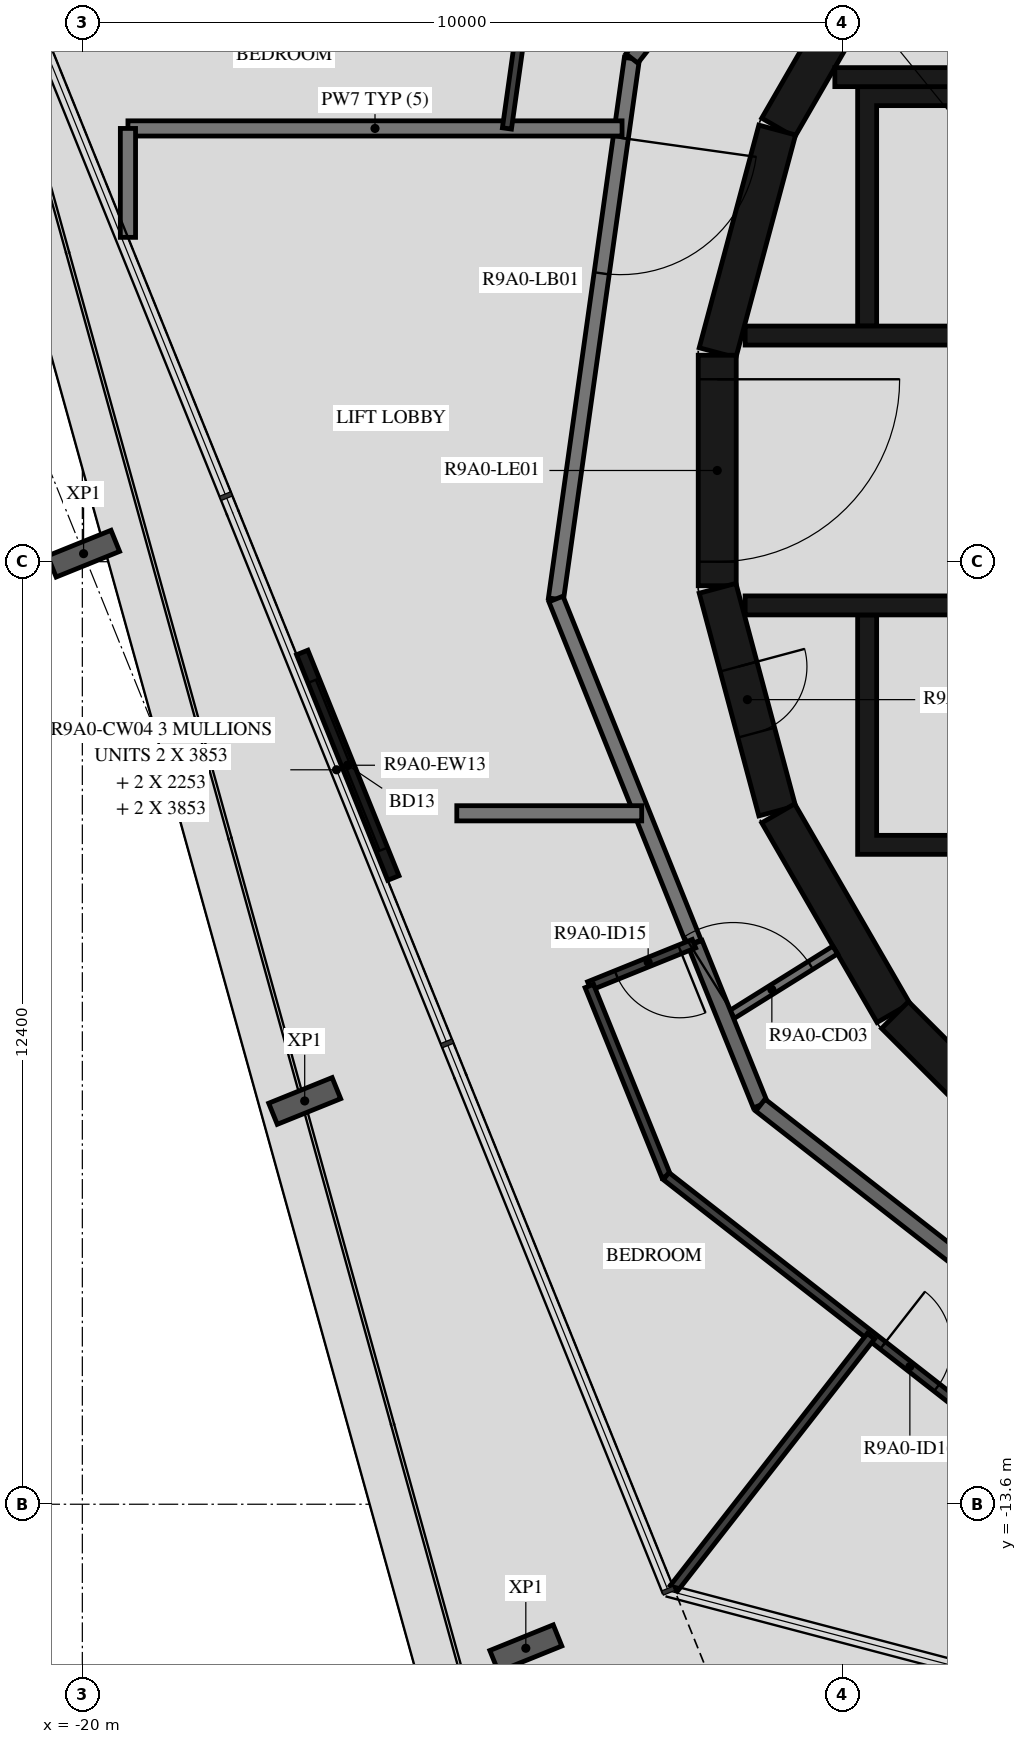
"""IFC4 building model, lengths in metres.
Left out: names, types, materials, properties, quantities, classifications, styles, units other than length and angle.
Written with IfcOpenShell. Run it as: python <this file> out.ifc"""

import sys

from ifc_helpers import new_model, si_unit, direction, frame, frame_2d, origin, origin_2d, place, context, subcontext, project, spatial, polyline, rectangle, i_section, outline, extrude, element, fill, save


model = new_model("IFC4")
c1 = context("Model", 3, precision=1e-05, world=origin(), true_north=direction((0.0, 1.0)))
c2 = subcontext(c1, "Body", "Model", "MODEL_VIEW")
j1 = project(units=[si_unit("LENGTHUNIT", "METRE"), si_unit("PLANEANGLEUNIT", "RADIAN")], contexts=[c1])
p1 = place(None, origin())
s1 = spatial("IfcSite", under=j1, at=p1, CompositionType="ELEMENT")
p2 = place(p1, origin())
s2 = spatial("IfcBuilding", under=s1, at=p2, CompositionType="ELEMENT")
p3 = place(p2, frame((0.0, 0.0, 333.0)))
s3 = spatial("IfcBuildingStorey", under=s2, at=p3, CompositionType="ELEMENT", Elevation=333.0)
for number, where, z_axis, x_axis in (
    (1, (-19.984, -1.094, -0.45), (0.0, 0.0, 1.0), (-0.375, 0.927, 0.0)),
    (2, (-17.075, -8.294, -0.45), (0.0, 0.0, 1.0), (-0.375, 0.927, 0.0)),
    (3, (-14.166, -15.495, -0.45), (0.0, 0.0, 1.0), (-0.375, 0.927, 0.0)),
):
    element("IfcColumn", number, at=place(p3, frame(where, z_axis=z_axis, x_axis=x_axis)), inside=s3, PredefinedType="COLUMN", context=c2, shape_type="SweptSolid", body=[
        extrude(i_section(OverallWidth=0.3, OverallDepth=0.9, WebThickness=0.019, FlangeThickness=0.035, FilletRadius=0.03, at=origin_2d()), origin(), (0.0, 0.0, 1.0), 3.57),
    ])
p4 = place(p3, frame((-17.107, -2.394, 0.0), z_axis=(0.0, 0.0, 1.0), x_axis=(0.374598019739, -0.927187318511, 0.0)))
e4 = element("IfcWall", 4, at=p4, inside=s3, PredefinedType="STANDARD", context=c2, shape_type="SweptSolid", body=[
    extrude(rectangle(XDim=3.2, YDim=0.16, at=frame_2d((1.6, 0.0))), origin(), (0.0, 0.0, 1.0), 3.12),
])
p5 = place(p4, frame((0.4, 0.0, 0.0)))
e5 = element("IfcOpeningElement", 5, at=p5, cuts=e4, PredefinedType="OPENING", context=c2, shape_type="SweptSolid", body=[
    extrude(rectangle(XDim=2.4, YDim=2.4, at=frame_2d((1.2, 1.2))), frame((0.0, 0.09, 0.0), z_axis=(0.0, -1.0, 0.0), x_axis=(1.0, 0.0, 0.0)), (0.0, 0.0, 1.0), 0.18),
])
for number, where, z_axis, x_axis in (
    (6, (-9.329, 7.137, 0.0), (0.0, 0.0, 1.0), (-0.5, -0.866, 0.0)),
    (7, (-10.858, 4.479, 0.0), (0.0, 0.0, 1.0), (-0.259, -0.966, 0.0)),
):
    element("IfcWall", number, at=place(p3, frame(where, z_axis=z_axis, x_axis=x_axis)), inside=s3, PredefinedType="SHEAR", context=c2, shape_type="SweptSolid", body=[
        extrude(rectangle(XDim=3.033, YDim=0.5, at=frame_2d((1.516, 0.0))), origin(), (0.0, 0.0, 1.0), 3.12),
    ])
p6 = place(p3, frame((-11.647, 1.516, 0.0), z_axis=(0.0, 0.0, 1.0), x_axis=(0.0, -1.0, 0.0)))
e8 = element("IfcWall", 8, at=p6, inside=s3, PredefinedType="SHEAR", context=c2, shape_type="SweptSolid", body=[
    extrude(rectangle(XDim=3.033, YDim=0.5, at=frame_2d((1.516, 0.0))), origin(), (0.0, 0.0, 1.0), 3.12),
])
p7 = place(p6, frame((0.316, 0.0, 0.0)))
e9 = element("IfcOpeningElement", 9, at=p7, cuts=e8, PredefinedType="OPENING", context=c2, shape_type="SweptSolid", body=[
    extrude(rectangle(XDim=2.4, YDim=2.1, at=frame_2d((1.2, 1.05))), frame((0.0, 0.26, 0.0), z_axis=(0.0, -1.0, 0.0), x_axis=(1.0, 0.0, 0.0)), (0.0, 0.0, 1.0), 0.52),
])
p8 = place(p3, frame((-11.643, -1.55, 0.0), z_axis=(0.0, 0.0, 1.0), x_axis=(0.258734743916, -0.965948410781, 0.0)))
e10 = element("IfcWall", 10, at=p8, inside=s3, PredefinedType="SHEAR", context=c2, shape_type="SweptSolid", body=[
    extrude(rectangle(XDim=3.033, YDim=0.5, at=frame_2d((1.516, 0.0))), origin(), (0.0, 0.0, 1.0), 3.12),
])
p9 = place(p8, frame((1.066, 0.0, 0.0)))
e11 = element("IfcOpeningElement", 11, at=p9, cuts=e10, PredefinedType="OPENING", context=c2, shape_type="SweptSolid", body=[
    extrude(rectangle(XDim=0.9, YDim=2.1, at=frame_2d((0.45, 1.05))), frame((0.0, 0.26, 0.0), z_axis=(0.0, -1.0, 0.0), x_axis=(1.0, 0.0, 0.0)), (0.0, 0.0, 1.0), 0.52),
])
p10 = place(p3, frame((-10.845, -4.51, 0.0), z_axis=(0.0, 0.0, 1.0), x_axis=(0.500087131594, -0.865975092491, 0.0)))
e12 = element("IfcWall", 12, at=p10, inside=s3, PredefinedType="SHEAR", context=c2, shape_type="SweptSolid", body=[
    extrude(rectangle(XDim=3.033, YDim=0.5, at=frame_2d((1.516, 0.0))), origin(), (0.0, 0.0, 1.0), 3.12),
])
p11 = place(p3, frame((-9.308, -7.164, 0.0), z_axis=(0.0, 0.0, 1.0), x_axis=(0.707106781187, -0.707106781187, 0.0)))
e13 = element("IfcWall", 13, at=p11, inside=s3, PredefinedType="SHEAR", context=c2, shape_type="SweptSolid", body=[
    extrude(rectangle(XDim=3.032, YDim=0.5, at=frame_2d((1.516, 0.0))), origin(), (0.0, 0.0, 1.0), 3.12),
])
p12 = place(p3, frame((-7.0, 5.175, 0.0), z_axis=(0.0, 0.0, 1.0), x_axis=(-1.0, 0.0, 0.0)))
e14 = element("IfcWall", 14, at=p12, inside=s3, PredefinedType="SHEAR", context=c2, shape_type="SweptSolid", body=[
    extrude(rectangle(XDim=3.1, YDim=0.25, at=frame_2d((1.55, 0.0))), origin(), (0.0, 0.0, 1.0), 3.12),
])
p13 = place(p3, origin())
e15 = element("IfcWall", 15, at=p13, inside=s3, PredefinedType="SHEAR", context=c2, shape_type="SweptSolid", body=[
    extrude(outline(polyline([(-9.8, 1.9), (-9.55, 1.9), (-9.55, 4.8), (-3.35, 4.8), (-3.35, 1.9), (-3.1, 1.9), (-3.1, 4.8), (3.1, 4.8), (3.1, 1.9), (3.35, 1.9), (3.35, 4.8), (5.25, 4.8), (5.25, 1.9), (5.5, 1.9), (5.5, 4.8), (7.4, 4.8), (7.4, 1.9), (7.65, 1.9), (7.65, 4.8), (9.55, 4.8), (9.55, 1.9), (9.8, 1.9), (9.8, 4.8), (9.8, 5.05), (-9.8, 5.05), (-9.8, 4.8), (-9.8, 1.9)])), origin(), (0.0, 0.0, 1.0), 3.12),
])
p14 = place(p3, origin())
e16 = element("IfcWall", 16, at=p14, inside=s3, PredefinedType="SHEAR", context=c2, shape_type="SweptSolid", body=[
    extrude(outline(polyline([(9.8, -5.05), (9.8, -4.8), (9.8, -1.9), (9.55, -1.9), (9.55, -4.8), (7.65, -4.8), (7.65, -1.9), (7.4, -1.9), (7.4, -4.8), (5.5, -4.8), (5.5, -1.9), (5.25, -1.9), (5.25, -4.8), (3.35, -4.8), (3.35, -1.9), (3.1, -1.9), (3.1, -4.8), (1.2, -4.8), (1.2, -1.9), (0.95, -1.9), (0.95, -4.8), (-0.95, -4.8), (-0.95, -1.9), (-1.2, -1.9), (-1.2, -4.8), (-3.1, -4.8), (-3.1, -1.9), (-3.35, -1.9), (-3.35, -4.8), (-5.25, -4.8), (-5.25, -1.9), (-5.5, -1.9), (-5.5, -4.8), (-9.55, -4.8), (-9.55, -1.9), (-9.8, -1.9), (-9.8, -4.8), (-9.8, -5.05), (9.8, -5.05)])), origin(), (0.0, 0.0, 1.0), 3.12),
])
p15 = place(p3, frame((-11.28, 1.775, 0.0), z_axis=(0.0, 0.0, 1.0), x_axis=(1.0, 0.0, 0.0)))
e17 = element("IfcWall", 17, at=p15, inside=s3, PredefinedType="SHEAR", context=c2, shape_type="SweptSolid", body=[
    extrude(rectangle(XDim=14.38, YDim=0.25, at=frame_2d((7.19, 0.0))), origin(), (0.0, 0.0, 1.0), 3.12),
])
p16 = place(p15, frame((4.38, 0.0, 0.0)))
e18 = element("IfcOpeningElement", 18, at=p16, cuts=e17, PredefinedType="OPENING", context=c2, shape_type="SweptSolid", body=[
    extrude(rectangle(XDim=0.9, YDim=2.1, at=frame_2d((0.45, 1.05))), frame((0.0, 0.135, 0.0), z_axis=(0.0, -1.0, 0.0), x_axis=(1.0, 0.0, 0.0)), (0.0, 0.0, 1.0), 0.27),
])
p17 = place(p15, frame((10.83, 0.0, 0.0)))
e19 = element("IfcOpeningElement", 19, at=p17, cuts=e17, PredefinedType="OPENING", context=c2, shape_type="SweptSolid", body=[
    extrude(rectangle(XDim=0.9, YDim=2.1, at=frame_2d((0.45, 1.05))), frame((0.0, 0.135, 0.0), z_axis=(0.0, -1.0, 0.0), x_axis=(1.0, 0.0, 0.0)), (0.0, 0.0, 1.0), 0.27),
])
p18 = place(p3, frame((-11.28, -1.775, 0.0), z_axis=(0.0, 0.0, 1.0), x_axis=(1.0, 0.0, 0.0)))
e20 = element("IfcWall", 20, at=p18, inside=s3, PredefinedType="SHEAR", context=c2, shape_type="SweptSolid", body=[
    extrude(rectangle(XDim=14.38, YDim=0.25, at=frame_2d((7.19, 0.0))), origin(), (0.0, 0.0, 1.0), 3.12),
])
p19 = place(p18, frame((6.43, 0.0, 0.0)))
e21 = element("IfcOpeningElement", 21, at=p19, cuts=e20, PredefinedType="OPENING", context=c2, shape_type="SweptSolid", body=[
    extrude(rectangle(XDim=1.1, YDim=2.1, at=frame_2d((0.55, 1.05))), frame((0.0, 0.135, 0.0), z_axis=(0.0, -1.0, 0.0), x_axis=(1.0, 0.0, 0.0)), (0.0, 0.0, 1.0), 0.27),
])
p20 = place(p18, frame((8.58, 0.0, 0.0)))
e22 = element("IfcOpeningElement", 22, at=p20, cuts=e20, PredefinedType="OPENING", context=c2, shape_type="SweptSolid", body=[
    extrude(rectangle(XDim=1.1, YDim=2.1, at=frame_2d((0.55, 1.05))), frame((0.0, 0.135, 0.0), z_axis=(0.0, -1.0, 0.0), x_axis=(1.0, 0.0, 0.0)), (0.0, 0.0, 1.0), 0.27),
])
p21 = place(p18, frame((10.73, 0.0, 0.0)))
e23 = element("IfcOpeningElement", 23, at=p21, cuts=e20, PredefinedType="OPENING", context=c2, shape_type="SweptSolid", body=[
    extrude(rectangle(XDim=1.1, YDim=2.1, at=frame_2d((0.55, 1.05))), frame((0.0, 0.135, 0.0), z_axis=(0.0, -1.0, 0.0), x_axis=(1.0, 0.0, 0.0)), (0.0, 0.0, 1.0), 0.27),
])
p22 = place(p18, frame((3.305, 0.0, 0.0)))
e24 = element("IfcOpeningElement", 24, at=p22, cuts=e20, PredefinedType="OPENING", context=c2, shape_type="SweptSolid", body=[
    extrude(rectangle(XDim=0.9, YDim=2.1, at=frame_2d((0.45, 1.05))), frame((0.0, 0.135, 0.0), z_axis=(0.0, -1.0, 0.0), x_axis=(1.0, 0.0, 0.0)), (0.0, 0.0, 1.0), 0.27),
])
p23 = place(p18, frame((12.98, 0.0, 0.0)))
e25 = element("IfcOpeningElement", 25, at=p23, cuts=e20, PredefinedType="OPENING", context=c2, shape_type="SweptSolid", body=[
    extrude(rectangle(XDim=0.9, YDim=2.1, at=frame_2d((0.45, 1.05))), frame((0.0, 0.135, 0.0), z_axis=(0.0, -1.0, 0.0), x_axis=(1.0, 0.0, 0.0)), (0.0, 0.0, 1.0), 0.27),
])
p24 = place(p3, frame((-11.539, -7.21, 0.0), z_axis=(0.0, 0.0, 1.0), x_axis=(0.848103039868, 0.529831325769, 0.0)))
e26 = element("IfcWall", 26, at=p24, inside=s3, PredefinedType="PARTITIONING", context=c2, shape_type="SweptSolid", body=[
    extrude(rectangle(XDim=1.702, YDim=0.12, at=frame_2d((0.851, 0.0))), origin(), (0.0, 0.0, 1.0), 3.12),
])
p25 = place(p24, frame((0.12, 0.0, 0.0)))
e27 = element("IfcOpeningElement", 27, at=p25, cuts=e26, PredefinedType="OPENING", context=c2, shape_type="SweptSolid", body=[
    extrude(rectangle(XDim=1.2, YDim=2.1, at=frame_2d((0.6, 1.05))), frame((0.0, 0.07, 0.0), z_axis=(0.0, -1.0, 0.0), x_axis=(1.0, 0.0, 0.0)), (0.0, 0.0, 1.0), 0.14),
])
p26 = place(p3, frame((-12.77, 5.42, 0.0), z_axis=(0.0, 0.0, 1.0), x_axis=(-0.139155334385, -0.990270565508, 0.0)))
e28 = element("IfcWall", 28, at=p26, inside=s3, PredefinedType="STANDARD", context=c2, shape_type="SweptSolid", body=[
    extrude(rectangle(XDim=7.181, YDim=0.2, at=frame_2d((3.59, 0.0))), origin(), (0.0, 0.0, 1.0), 3.12),
])
p27 = place(p26, frame((1.055, 0.0, 0.0)))
e29 = element("IfcOpeningElement", 29, at=p27, cuts=e28, PredefinedType="OPENING", context=c2, shape_type="SweptSolid", body=[
    extrude(rectangle(XDim=1.8, YDim=2.1, at=frame_2d((0.9, 1.05))), frame((0.0, 0.11, 0.0), z_axis=(0.0, -1.0, 0.0), x_axis=(1.0, 0.0, 0.0)), (0.0, 0.0, 1.0), 0.22),
])
p28 = place(p3, frame((-13.769, -1.691, 0.0), z_axis=(0.0, 0.0, 1.0), x_axis=(0.372720094028, -0.927943819155, 0.0)))
e30 = element("IfcWall", 30, at=p28, inside=s3, PredefinedType="STANDARD", context=c2, shape_type="SweptSolid", body=[
    extrude(rectangle(XDim=4.875, YDim=0.2, at=frame_2d((2.438, 0.0))), origin(), (0.0, 0.0, 1.0), 3.12),
])
p29 = place(p3, frame((-8.349, 11.079, 0.0), z_axis=(0.0, 0.0, 1.0), x_axis=(-0.615669112324, -0.78800478687, 0.0)))
e31 = element("IfcWall", 31, at=p29, inside=s3, PredefinedType="STANDARD", context=c2, shape_type="SweptSolid", body=[
    extrude(rectangle(XDim=7.181, YDim=0.2, at=frame_2d((3.591, 0.0))), origin(), (0.0, 0.0, 1.0), 3.12),
])
p30 = place(p29, frame((2.1, 0.0, 0.0)))
e32 = element("IfcOpeningElement", 32, at=p30, cuts=e31, PredefinedType="OPENING", context=c2, shape_type="SweptSolid", body=[
    extrude(rectangle(XDim=1.0, YDim=2.1, at=frame_2d((0.5, 1.05))), frame((0.0, 0.11, 0.0), z_axis=(0.0, -1.0, 0.0), x_axis=(1.0, 0.0, 0.0)), (0.0, 0.0, 1.0), 0.22),
])
p31 = place(p29, frame((3.811, 0.0, 0.0)))
e33 = element("IfcOpeningElement", 33, at=p31, cuts=e31, PredefinedType="OPENING", context=c2, shape_type="SweptSolid", body=[
    extrude(rectangle(XDim=1.0, YDim=2.1, at=frame_2d((0.5, 1.05))), frame((0.0, 0.11, 0.0), z_axis=(0.0, -1.0, 0.0), x_axis=(1.0, 0.0, 0.0)), (0.0, 0.0, 1.0), 0.22),
])
p32 = place(p3, frame((-11.939, -6.22, 0.0), z_axis=(0.0, 0.0, 1.0), x_axis=(0.374651128394, -0.927165860024, 0.0)))
e34 = element("IfcWall", 34, at=p32, inside=s3, PredefinedType="STANDARD", context=c2, shape_type="SweptSolid", body=[
    extrude(rectangle(XDim=2.296, YDim=0.2, at=frame_2d((1.148, 0.0))), origin(), (0.0, 0.0, 1.0), 3.12),
])
p33 = place(p3, frame((-11.079, -8.349, 0.0), z_axis=(0.0, 0.0, 1.0), x_axis=(0.78800478687, -0.615669112324, 0.0)))
e35 = element("IfcWall", 35, at=p33, inside=s3, PredefinedType="STANDARD", context=c2, shape_type="SweptSolid", body=[
    extrude(rectangle(XDim=7.181, YDim=0.2, at=frame_2d((3.591, 0.0))), origin(), (0.0, 0.0, 1.0), 3.12),
])
p34 = place(p3, frame((-12.899, 4.5, 0.0), z_axis=(0.0, 0.0, 1.0), x_axis=(-1.0, 0.0, 0.0)))
e36 = element("IfcWall", 36, at=p34, inside=s3, PredefinedType="STANDARD", context=c2, shape_type="SweptSolid", body=[
    extrude(rectangle(XDim=6.5, YDim=0.2, at=frame_2d((3.25, 0.0))), origin(), (0.0, 0.0, 1.0), 3.12),
])
p35 = place(p3, frame((-19.4, 4.5, 0.0), z_axis=(0.0, 0.0, 1.0), x_axis=(0.0, -1.0, 0.0)))
e37 = element("IfcWall", 37, at=p35, inside=s3, PredefinedType="STANDARD", context=c2, shape_type="SweptSolid", body=[
    extrude(rectangle(XDim=1.433, YDim=0.2, at=frame_2d((0.716, 0.0))), origin(), (0.0, 0.0, 1.0), 3.12),
])
p36 = place(p3, frame((-15.074, -4.51, 0.0), z_axis=(0.0, 0.0, 1.0), x_axis=(1.0, 0.0, 0.0)))
e38 = element("IfcWall", 38, at=p36, inside=s3, PredefinedType="STANDARD", context=c2, shape_type="SweptSolid", body=[
    extrude(rectangle(XDim=2.433, YDim=0.2, at=frame_2d((1.216, 0.0))), origin(), (0.0, 0.0, 1.0), 3.12),
])
p37 = place(p3, frame((-14.248, 5.683, 0.0), z_axis=(0.0, 0.0, 1.0), x_axis=(-0.139189066398, -0.990265824814, 0.0)))
e39 = element("IfcWall", 39, at=p37, inside=s3, PredefinedType="PARTITIONING", context=c2, shape_type="SweptSolid", body=[
    extrude(rectangle(XDim=1.195, YDim=0.12, at=frame_2d((0.597, 0.0))), origin(), (0.0, 0.0, 1.0), 3.12),
])
p38 = place(p3, frame((-11.953, -6.225, 0.0), z_axis=(0.0, 0.0, 1.0), x_axis=(-0.927144096717, -0.374704982518, 0.0)))
e40 = element("IfcWall", 40, at=p38, inside=s3, PredefinedType="PARTITIONING", context=c2, shape_type="SweptSolid", body=[
    extrude(rectangle(XDim=1.485, YDim=0.12, at=frame_2d((0.742, 0.0))), origin(), (0.0, 0.0, 1.0), 3.12),
])
p39 = place(p38, frame((0.2, 0.0, 0.0)))
e41 = element("IfcOpeningElement", 41, at=p39, cuts=e40, PredefinedType="OPENING", context=c2, shape_type="SweptSolid", body=[
    extrude(rectangle(XDim=0.9, YDim=2.1, at=frame_2d((0.45, 1.05))), frame((0.0, 0.07, 0.0), z_axis=(0.0, -1.0, 0.0), x_axis=(1.0, 0.0, 0.0)), (0.0, 0.0, 1.0), 0.14),
])
p40 = place(p3, frame((-13.33, -6.782, 0.0), z_axis=(0.0, 0.0, 1.0), x_axis=(0.374602180132, -0.927185637637, 0.0)))
e42 = element("IfcWall", 42, at=p40, inside=s3, PredefinedType="PARTITIONING", context=c2, shape_type="SweptSolid", body=[
    extrude(rectangle(XDim=2.698, YDim=0.12, at=frame_2d((1.349, 0.0))), origin(), (0.0, 0.0, 1.0), 3.12),
])
p41 = place(p3, frame((-12.319, -9.283, 0.0), z_axis=(0.0, 0.0, 1.0), x_axis=(0.788000268464, -0.61567489546, 0.0)))
e43 = element("IfcWall", 43, at=p41, inside=s3, PredefinedType="PARTITIONING", context=c2, shape_type="SweptSolid", body=[
    extrude(rectangle(XDim=7.985, YDim=0.12, at=frame_2d((3.992, 0.0))), origin(), (0.0, 0.0, 1.0), 3.12),
])
p42 = place(p41, frame((3.619, 0.0, 0.0)))
e44 = element("IfcOpeningElement", 44, at=p42, cuts=e43, PredefinedType="OPENING", context=c2, shape_type="SweptSolid", body=[
    extrude(rectangle(XDim=0.9, YDim=2.1, at=frame_2d((0.45, 1.05))), frame((0.0, 0.07, 0.0), z_axis=(0.0, -1.0, 0.0), x_axis=(1.0, 0.0, 0.0)), (0.0, 0.0, 1.0), 0.14),
])
p43 = place(p3, frame((-12.219, -14.708, 0.0), z_axis=(0.0, 0.0, 1.0), x_axis=(0.615656413137, 0.788014708596, 0.0)))
e45 = element("IfcWall", 45, at=p43, inside=s3, PredefinedType="PARTITIONING", context=c2, shape_type="SweptSolid", body=[
    extrude(rectangle(XDim=4.213, YDim=0.12, at=frame_2d((2.106, 0.0))), origin(), (0.0, 0.0, 1.0), 3.12),
])
p44 = place(p5, origin())
e46 = element("IfcDoor", 46, at=p44, inside=s3, OperationType="DOUBLE_DOOR_SLIDING", PredefinedType="DOOR", context=c2, shape_type="SweptSolid", body=[
    extrude(rectangle(XDim=2.4, YDim=2.4, at=frame_2d((1.2, 1.2))), frame((0.0, 0.025, 0.0), z_axis=(0.0, -1.0, 0.0), x_axis=(1.0, 0.0, 0.0)), (0.0, 0.0, 1.0), 0.05),
])
fill(e5, e46)
p45 = place(p7, origin())
e47 = element("IfcDoor", 47, at=p45, inside=s3, OperationType="DOUBLE_DOOR_SINGLE_SWING", PredefinedType="DOOR", context=c2, shape_type="SweptSolid", body=[
    extrude(rectangle(XDim=2.4, YDim=2.1, at=frame_2d((1.2, 1.05))), frame((0.0, 0.025, 0.0), z_axis=(0.0, -1.0, 0.0), x_axis=(1.0, 0.0, 0.0)), (0.0, 0.0, 1.0), 0.05),
])
fill(e9, e47)
p46 = place(p9, origin())
e48 = element("IfcDoor", 48, at=p46, inside=s3, OperationType="SINGLE_SWING_RIGHT", PredefinedType="DOOR", context=c2, shape_type="SweptSolid", body=[
    extrude(rectangle(XDim=0.9, YDim=2.1, at=frame_2d((0.45, 1.05))), frame((0.0, 0.025, 0.0), z_axis=(0.0, -1.0, 0.0), x_axis=(1.0, 0.0, 0.0)), (0.0, 0.0, 1.0), 0.05),
])
fill(e11, e48)
p47 = place(p39, origin())
e49 = element("IfcDoor", 49, at=p47, inside=s3, OperationType="SINGLE_SWING_LEFT", PredefinedType="DOOR", context=c2, shape_type="SweptSolid", body=[
    extrude(rectangle(XDim=0.9, YDim=2.1, at=frame_2d((0.45, 1.05))), frame((0.0, 0.025, 0.0), z_axis=(0.0, -1.0, 0.0), x_axis=(1.0, 0.0, 0.0)), (0.0, 0.0, 1.0), 0.05),
])
fill(e41, e49)
p48 = place(p42, origin())
e50 = element("IfcDoor", 50, at=p48, inside=s3, OperationType="SINGLE_SWING_RIGHT", PredefinedType="DOOR", context=c2, shape_type="SweptSolid", body=[
    extrude(rectangle(XDim=0.9, YDim=2.1, at=frame_2d((0.45, 1.05))), frame((0.0, 0.025, 0.0), z_axis=(0.0, -1.0, 0.0), x_axis=(1.0, 0.0, 0.0)), (0.0, 0.0, 1.0), 0.05),
])
fill(e44, e50)
p49 = place(p25, origin())
e51 = element("IfcDoor", 51, at=p49, inside=s3, OperationType="DOUBLE_DOOR_SINGLE_SWING", PredefinedType="DOOR", context=c2, shape_type="SweptSolid", body=[
    extrude(rectangle(XDim=1.2, YDim=2.1, at=frame_2d((0.6, 1.05))), frame((0.0, 0.025, 0.0), z_axis=(0.0, -1.0, 0.0), x_axis=(1.0, 0.0, 0.0)), (0.0, 0.0, 1.0), 0.05),
])
fill(e27, e51)
p50 = place(p27, origin())
e52 = element("IfcDoor", 52, at=p50, inside=s3, OperationType="DOUBLE_DOOR_SINGLE_SWING", PredefinedType="DOOR", context=c2, shape_type="SweptSolid", body=[
    extrude(rectangle(XDim=1.8, YDim=2.1, at=frame_2d((0.9, 1.05))), frame((0.0, 0.025, 0.0), z_axis=(0.0, -1.0, 0.0), x_axis=(1.0, 0.0, 0.0)), (0.0, 0.0, 1.0), 0.05),
])
fill(e29, e52)
save(model, sys.argv[1])
